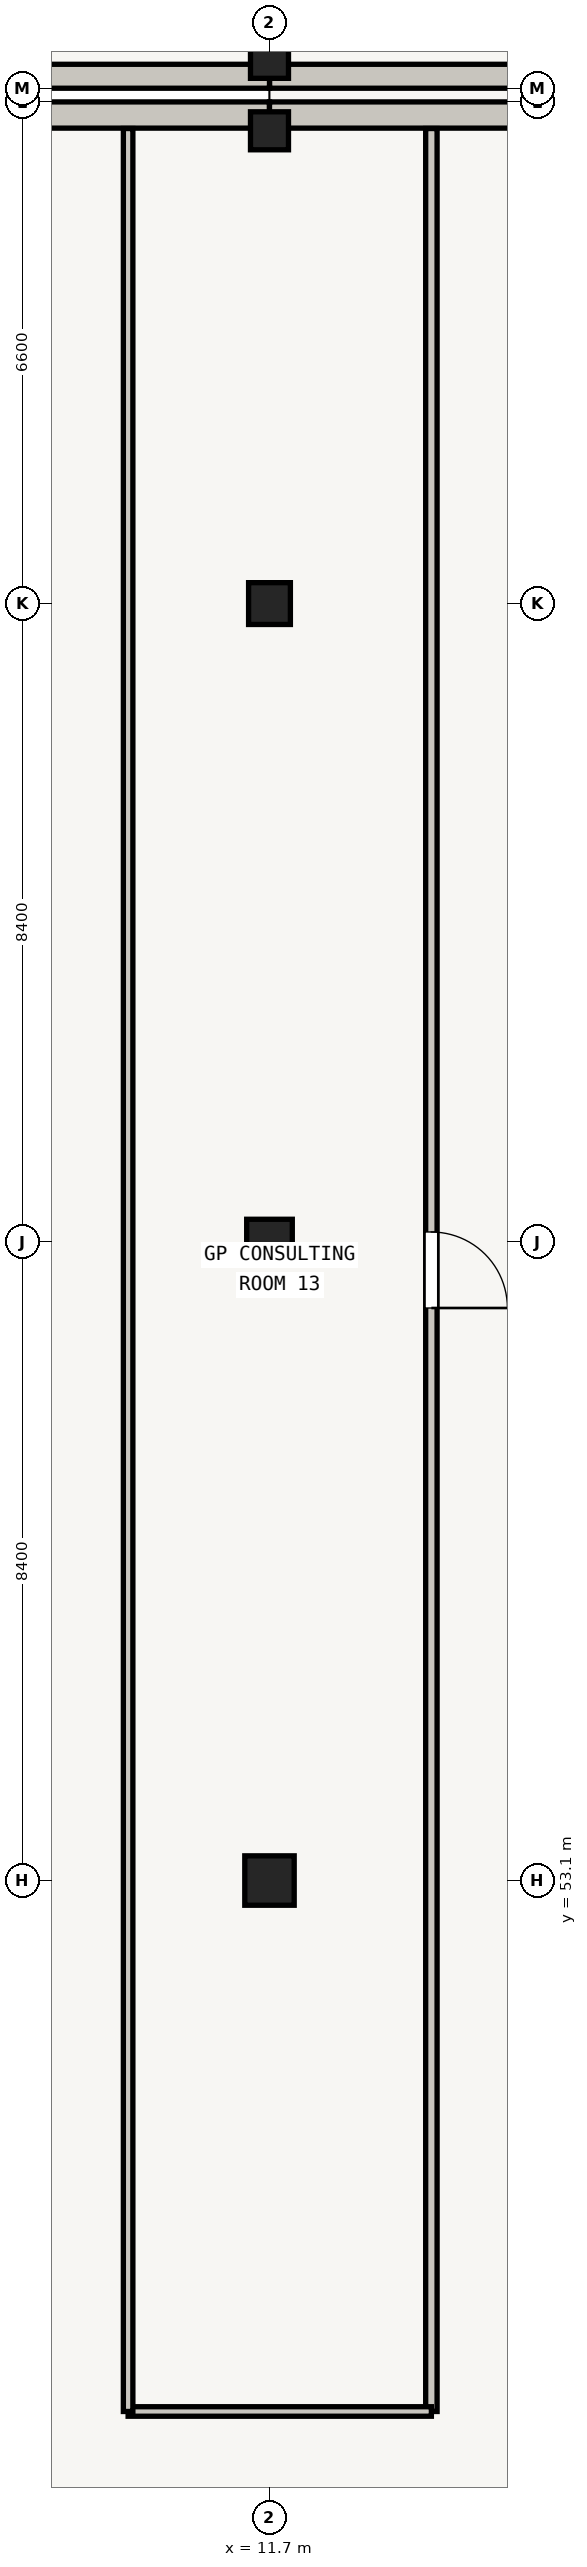
"""IFC4 building model, lengths in metres.
Left out: names, types, materials, properties, quantities, classifications, styles, units other than length and angle.
Written with IfcOpenShell. Run it as: python <this file> out.ifc"""

import sys

from ifc_helpers import new_model, si_unit, direction, frame, frame_2d, origin, origin_2d, place, context, subcontext, project, spatial, rectangle, extrude, element, fill, save


model = new_model("IFC4")
c1 = context("Model", 3, precision=1e-05, world=origin(), true_north=direction((0.0, 1.0)))
c2 = subcontext(c1, "Body", "Model", "MODEL_VIEW")
j1 = project(units=[si_unit("LENGTHUNIT", "METRE"), si_unit("PLANEANGLEUNIT", "RADIAN")], contexts=[c1])
p1 = place(None, origin())
s1 = spatial("IfcSite", under=j1, at=p1, CompositionType="ELEMENT")
p2 = place(p1, origin())
s2 = spatial("IfcBuilding", under=s1, at=p2, CompositionType="ELEMENT")
p3 = place(p2, frame((0.0, 0.0, 4.5)))
s3 = spatial("IfcBuildingStorey", under=s2, at=p3, CompositionType="ELEMENT", Elevation=4.5)
p4 = place(p3, frame((11.7, 53.1, 0.0), z_axis=(0.0, 0.0, 1.0), x_axis=(1.0, 0.0, 0.0)))
e1 = element("IfcColumn", 1, at=p4, inside=s3, PredefinedType="COLUMN", context=c2, shape_type="SweptSolid", body=[
    extrude(rectangle(XDim=0.65, YDim=0.65, at=origin_2d()), origin(), (0.0, 0.0, 1.0), 3.92),
])
p5 = place(p3, frame((11.7, 61.5, 0.0), z_axis=(0.0, 0.0, 1.0), x_axis=(1.0, 0.0, 0.0)))
e2 = element("IfcColumn", 2, at=p5, inside=s3, PredefinedType="COLUMN", context=c2, shape_type="SweptSolid", body=[
    extrude(rectangle(XDim=0.6, YDim=0.6, at=origin_2d()), origin(), (0.0, 0.0, 1.0), 3.92),
])
p6 = place(p3, frame((11.7, 69.9, 0.0), z_axis=(0.0, 0.0, 1.0), x_axis=(1.0, 0.0, 0.0)))
e3 = element("IfcColumn", 3, at=p6, inside=s3, PredefinedType="COLUMN", context=c2, shape_type="SweptSolid", body=[
    extrude(rectangle(XDim=0.55, YDim=0.55, at=origin_2d()), origin(), (0.0, 0.0, 1.0), 3.92),
])
p7 = place(p3, frame((11.7, 76.12, 0.0), z_axis=(0.0, 0.0, 1.0), x_axis=(1.0, 0.0, 0.0)))
e4 = element("IfcColumn", 4, at=p7, inside=s3, PredefinedType="COLUMN", context=c2, shape_type="SweptSolid", body=[
    extrude(rectangle(XDim=0.5, YDim=0.5, at=origin_2d()), origin(), (0.0, 0.0, 1.0), 3.92),
])
p8 = place(p3, frame((11.7, 77.06, 0.0), z_axis=(0.0, 0.0, 1.0), x_axis=(1.0, 0.0, 0.0)))
e5 = element("IfcColumn", 5, at=p8, inside=s3, PredefinedType="COLUMN", context=c2, shape_type="SweptSolid", body=[
    extrude(rectangle(XDim=0.5, YDim=0.5, at=origin_2d()), origin(), (0.0, 0.0, 1.0), 3.935),
])
for number, where, z_axis, x_axis in (
    (6, (4.5, 76.327, 0.0), (0.0, 0.0, 1.0), (1.0, 0.0, 0.0)),
    (7, (11.7, 76.327, 0.0), (0.0, 0.0, 1.0), (1.0, 0.0, 0.0)),
):
    element("IfcWall", number, at=place(p3, frame(where, z_axis=z_axis, x_axis=x_axis)), inside=s3, PredefinedType="SOLIDWALL", context=c2, shape_type="SweptSolid", body=[
        extrude(rectangle(XDim=7.2, YDim=0.345, at=frame_2d((3.6, 0.0))), origin(), (0.0, 0.0, 1.0), 3.255),
    ])
for number, where, z_axis, x_axis in (
    (8, (18.9, 76.837, 0.0), (0.0, 0.0, 1.0), (-1.0, 0.0, 0.0)),
    (9, (11.7, 76.837, 0.0), (0.0, 0.0, 1.0), (-1.0, 0.0, 0.0)),
):
    element("IfcWall", number, at=place(p3, frame(where, z_axis=z_axis, x_axis=x_axis)), inside=s3, PredefinedType="SOLIDWALL", context=c2, shape_type="SweptSolid", body=[
        extrude(rectangle(XDim=7.2, YDim=0.315, at=frame_2d((3.6, 0.0))), origin(), (0.0, 0.0, 1.0), 3.3),
    ])
p9 = place(p3, frame((13.83, 76.15, 0.0), z_axis=(0.0, 0.0, 1.0), x_axis=(0.0, -1.0, 0.0)))
e10 = element("IfcWall", 10, at=p9, inside=s3, PredefinedType="PARTITIONING", context=c2, shape_type="SweptSolid", body=[
    extrude(rectangle(XDim=30.035, YDim=0.15, at=frame_2d((15.018, 0.0))), origin(), (0.0, 0.0, 1.0), 2.94),
])
p10 = place(p9, frame((14.518, 0.0, 0.0)))
e11 = element("IfcOpeningElement", 11, at=p10, cuts=e10, PredefinedType="OPENING", context=c2, shape_type="SweptSolid", body=[
    extrude(rectangle(XDim=1.0, YDim=2.05, at=frame_2d((0.5, 1.025))), frame((0.0, 0.075, 0.0), z_axis=(0.0, -1.0, 0.0), x_axis=(1.0, 0.0, 0.0)), (0.0, 0.0, 1.0), 0.15),
])
p11 = place(p3, frame((13.83, 46.115, 0.0), z_axis=(0.0, 0.0, 1.0), x_axis=(-1.0, 0.0, 0.0)))
e12 = element("IfcWall", 12, at=p11, inside=s3, PredefinedType="PARTITIONING", context=c2, shape_type="SweptSolid", body=[
    extrude(rectangle(XDim=3.99, YDim=0.125, at=frame_2d((1.995, 0.0))), origin(), (0.0, 0.0, 1.0), 2.94),
])
p12 = place(p3, frame((9.84, 46.115, 0.0), z_axis=(0.0, 0.0, 1.0), x_axis=(0.0, 1.0, 0.0)))
e13 = element("IfcWall", 13, at=p12, inside=s3, PredefinedType="PARTITIONING", context=c2, shape_type="SweptSolid", body=[
    extrude(rectangle(XDim=30.035, YDim=0.125, at=frame_2d((15.018, 0.0))), origin(), (0.0, 0.0, 1.0), 2.94),
])
p13 = place(p10, origin())
e14 = element("IfcDoor", 14, at=p13, inside=s3, OperationType="SINGLE_SWING_RIGHT", PredefinedType="DOOR", context=c2, shape_type="SweptSolid", body=[
    extrude(rectangle(XDim=1.0, YDim=2.05, at=frame_2d((0.5, 1.025))), frame((0.0, 0.025, 0.0), z_axis=(0.0, -1.0, 0.0), x_axis=(1.0, 0.0, 0.0)), (0.0, 0.0, 1.0), 0.05),
])
fill(e11, e14)
save(model, sys.argv[1])
